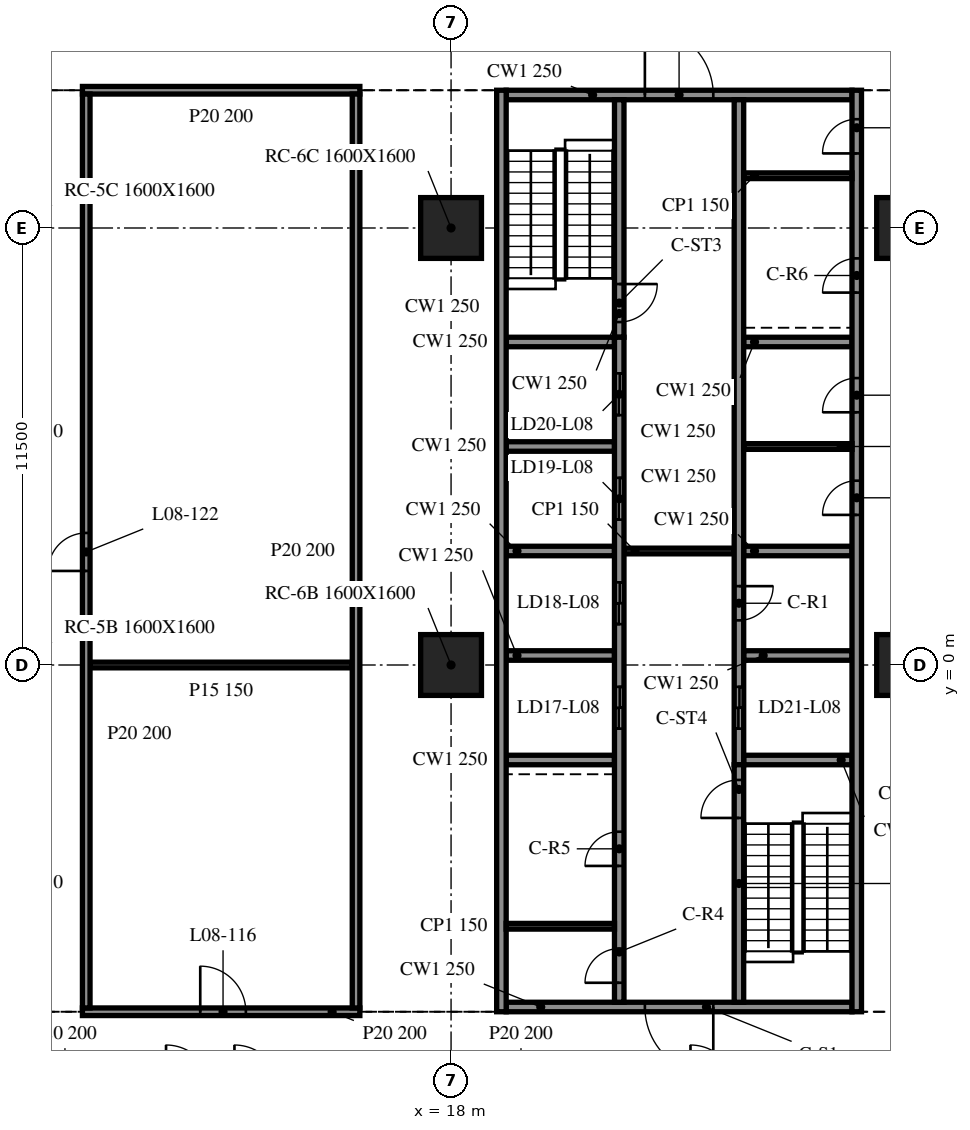
"""IFC4 building model, lengths in metres.
Left out: names, types, materials, properties, quantities, classifications, styles, units other than length and angle.
Written with IfcOpenShell. Run it as: python <this file> out.ifc"""

import sys

from ifc_helpers import new_model, si_unit, direction, frame, frame_2d, origin, origin_2d, place, context, subcontext, project, spatial, rectangle, extrude, element, fill, save


model = new_model("IFC4")
c1 = context("Model", 3, precision=1e-05, world=origin(), true_north=direction((0.0, 1.0)))
c2 = subcontext(c1, "Body", "Model", "MODEL_VIEW")
j1 = project(units=[si_unit("LENGTHUNIT", "METRE"), si_unit("PLANEANGLEUNIT", "RADIAN")], contexts=[c1])
p1 = place(None, origin())
s1 = spatial("IfcSite", under=j1, at=p1, CompositionType="ELEMENT")
p2 = place(p1, origin())
s2 = spatial("IfcBuilding", under=s1, at=p2, CompositionType="ELEMENT")
p3 = place(p2, frame((0.0, 0.0, 37.3)))
s3 = spatial("IfcBuildingStorey", under=s2, at=p3, CompositionType="ELEMENT", Elevation=37.3)
for number, where, z_axis, x_axis in (
    (1, (18.0, 0.0, -0.34), (0.0, 0.0, 1.0), (1.0, 0.0, 0.0)),
    (2, (18.0, 11.5, -0.34), (0.0, 0.0, 1.0), (1.0, 0.0, 0.0)),
    (3, (30.0, 0.0, -0.34), (0.0, 0.0, 1.0), (1.0, 0.0, 0.0)),
    (4, (30.0, 11.5, -0.34), (0.0, 0.0, 1.0), (1.0, 0.0, 0.0)),
):
    element("IfcColumn", number, at=place(p3, frame(where, z_axis=z_axis, x_axis=x_axis)), inside=s3, PredefinedType="COLUMN", context=c2, shape_type="SweptSolid", body=[
        extrude(rectangle(XDim=1.6, YDim=1.6, at=origin_2d()), origin(), (0.0, 0.0, 1.0), 4.09),
    ])
p4 = place(p3, frame((19.325, 15.125, 0.0), z_axis=(0.0, 0.0, 1.0), x_axis=(0.0, -1.0, 0.0)))
e5 = element("IfcWall", 5, at=p4, inside=s3, PredefinedType="SOLIDWALL", context=c2, shape_type="SweptSolid", body=[
    extrude(rectangle(XDim=24.25, YDim=0.25, at=frame_2d((12.125, 0.0))), origin(), (0.0, 0.0, 1.0), 3.75),
])
p5 = place(p3, frame((28.675, -9.125, 0.0), z_axis=(0.0, 0.0, 1.0), x_axis=(0.0, 1.0, 0.0)))
e6 = element("IfcWall", 6, at=p5, inside=s3, PredefinedType="SOLIDWALL", context=c2, shape_type="SweptSolid", body=[
    extrude(rectangle(XDim=24.25, YDim=0.25, at=frame_2d((12.125, 0.0))), origin(), (0.0, 0.0, 1.0), 3.75),
])
p6 = place(p5, frame((13.075, 0.0, 0.0)))
e7 = element("IfcOpeningElement", 7, at=p6, cuts=e6, PredefinedType="OPENING", context=c2, shape_type="SweptSolid", body=[
    extrude(rectangle(XDim=0.9, YDim=2.1, at=frame_2d((0.45, 1.05))), frame((0.0, 0.135, 0.0), z_axis=(0.0, -1.0, 0.0), x_axis=(1.0, 0.0, 0.0)), (0.0, 0.0, 1.0), 0.27),
])
p7 = place(p5, frame((15.775, 0.0, 0.0)))
e8 = element("IfcOpeningElement", 8, at=p7, cuts=e6, PredefinedType="OPENING", context=c2, shape_type="SweptSolid", body=[
    extrude(rectangle(XDim=0.9, YDim=2.1, at=frame_2d((0.45, 1.05))), frame((0.0, 0.135, 0.0), z_axis=(0.0, -1.0, 0.0), x_axis=(1.0, 0.0, 0.0)), (0.0, 0.0, 1.0), 0.27),
])
p8 = place(p5, frame((18.925, 0.0, 0.0)))
e9 = element("IfcOpeningElement", 9, at=p8, cuts=e6, PredefinedType="OPENING", context=c2, shape_type="SweptSolid", body=[
    extrude(rectangle(XDim=0.9, YDim=2.1, at=frame_2d((0.45, 1.05))), frame((0.0, 0.135, 0.0), z_axis=(0.0, -1.0, 0.0), x_axis=(1.0, 0.0, 0.0)), (0.0, 0.0, 1.0), 0.27),
])
p9 = place(p5, frame((22.587, 0.0, 0.0)))
e10 = element("IfcOpeningElement", 10, at=p9, cuts=e6, PredefinedType="OPENING", context=c2, shape_type="SweptSolid", body=[
    extrude(rectangle(XDim=0.9, YDim=2.1, at=frame_2d((0.45, 1.05))), frame((0.0, 0.135, 0.0), z_axis=(0.0, -1.0, 0.0), x_axis=(1.0, 0.0, 0.0)), (0.0, 0.0, 1.0), 0.27),
])
p10 = place(p3, frame((28.55, -9.0, 0.0), z_axis=(0.0, 0.0, 1.0), x_axis=(-1.0, 0.0, 0.0)))
e11 = element("IfcWall", 11, at=p10, inside=s3, PredefinedType="SOLIDWALL", context=c2, shape_type="SweptSolid", body=[
    extrude(rectangle(XDim=9.1, YDim=0.25, at=frame_2d((4.55, 0.0))), origin(), (0.0, 0.0, 1.0), 3.75),
])
p11 = place(p10, frame((3.65, 0.0, 0.0)))
e12 = element("IfcOpeningElement", 12, at=p11, cuts=e11, PredefinedType="OPENING", context=c2, shape_type="SweptSolid", body=[
    extrude(rectangle(XDim=1.8, YDim=2.1, at=frame_2d((0.9, 1.05))), frame((0.0, 0.135, 0.0), z_axis=(0.0, -1.0, 0.0), x_axis=(1.0, 0.0, 0.0)), (0.0, 0.0, 1.0), 0.27),
])
p12 = place(p3, frame((19.45, 15.0, 0.0), z_axis=(0.0, 0.0, 1.0), x_axis=(1.0, 0.0, 0.0)))
e13 = element("IfcWall", 13, at=p12, inside=s3, PredefinedType="SOLIDWALL", context=c2, shape_type="SweptSolid", body=[
    extrude(rectangle(XDim=9.1, YDim=0.25, at=frame_2d((4.55, 0.0))), origin(), (0.0, 0.0, 1.0), 3.75),
])
p13 = place(p12, frame((3.65, 0.0, 0.0)))
e14 = element("IfcOpeningElement", 14, at=p13, cuts=e13, PredefinedType="OPENING", context=c2, shape_type="SweptSolid", body=[
    extrude(rectangle(XDim=1.8, YDim=2.1, at=frame_2d((0.9, 1.05))), frame((0.0, 0.135, 0.0), z_axis=(0.0, -1.0, 0.0), x_axis=(1.0, 0.0, 0.0)), (0.0, 0.0, 1.0), 0.27),
])
p14 = place(p3, frame((22.425, -8.875, 0.0), z_axis=(0.0, 0.0, 1.0), x_axis=(0.0, 1.0, 0.0)))
e15 = element("IfcWall", 15, at=p14, inside=s3, PredefinedType="SOLIDWALL", context=c2, shape_type="SweptSolid", body=[
    extrude(rectangle(XDim=17.5, YDim=0.25, at=frame_2d((8.75, 0.0))), origin(), (0.0, 0.0, 1.0), 3.75),
])
p15 = place(p14, frame((7.2, 0.0, 0.0)))
e16 = element("IfcOpeningElement", 16, at=p15, cuts=e15, PredefinedType="OPENING", context=c2, shape_type="SweptSolid", body=[
    extrude(rectangle(XDim=1.1, YDim=2.1, at=frame_2d((0.55, 1.05))), frame((0.0, 0.135, 0.0), z_axis=(0.0, -1.0, 0.0), x_axis=(1.0, 0.0, 0.0)), (0.0, 0.0, 1.0), 0.27),
])
p16 = place(p14, frame((9.95, 0.0, 0.0)))
e17 = element("IfcOpeningElement", 17, at=p16, cuts=e15, PredefinedType="OPENING", context=c2, shape_type="SweptSolid", body=[
    extrude(rectangle(XDim=1.1, YDim=2.1, at=frame_2d((0.55, 1.05))), frame((0.0, 0.135, 0.0), z_axis=(0.0, -1.0, 0.0), x_axis=(1.0, 0.0, 0.0)), (0.0, 0.0, 1.0), 0.27),
])
p17 = place(p14, frame((12.7, 0.0, 0.0)))
e18 = element("IfcOpeningElement", 18, at=p17, cuts=e15, PredefinedType="OPENING", context=c2, shape_type="SweptSolid", body=[
    extrude(rectangle(XDim=1.1, YDim=2.1, at=frame_2d((0.55, 1.05))), frame((0.0, 0.135, 0.0), z_axis=(0.0, -1.0, 0.0), x_axis=(1.0, 0.0, 0.0)), (0.0, 0.0, 1.0), 0.27),
])
p18 = place(p14, frame((15.45, 0.0, 0.0)))
e19 = element("IfcOpeningElement", 19, at=p18, cuts=e15, PredefinedType="OPENING", context=c2, shape_type="SweptSolid", body=[
    extrude(rectangle(XDim=1.1, YDim=2.1, at=frame_2d((0.55, 1.05))), frame((0.0, 0.135, 0.0), z_axis=(0.0, -1.0, 0.0), x_axis=(1.0, 0.0, 0.0)), (0.0, 0.0, 1.0), 0.27),
])
p19 = place(p14, frame((0.512, 0.0, 0.0)))
e20 = element("IfcOpeningElement", 20, at=p19, cuts=e15, PredefinedType="OPENING", context=c2, shape_type="SweptSolid", body=[
    extrude(rectangle(XDim=0.9, YDim=2.1, at=frame_2d((0.45, 1.05))), frame((0.0, 0.135, 0.0), z_axis=(0.0, -1.0, 0.0), x_axis=(1.0, 0.0, 0.0)), (0.0, 0.0, 1.0), 0.27),
])
p20 = place(p14, frame((3.587, 0.0, 0.0)))
e21 = element("IfcOpeningElement", 21, at=p20, cuts=e15, PredefinedType="OPENING", context=c2, shape_type="SweptSolid", body=[
    extrude(rectangle(XDim=0.9, YDim=2.1, at=frame_2d((0.45, 1.05))), frame((0.0, 0.135, 0.0), z_axis=(0.0, -1.0, 0.0), x_axis=(1.0, 0.0, 0.0)), (0.0, 0.0, 1.0), 0.27),
])
p21 = place(p3, frame((22.425, 14.875, 0.0), z_axis=(0.0, 0.0, 1.0), x_axis=(0.0, -1.0, 0.0)))
e22 = element("IfcWall", 22, at=p21, inside=s3, PredefinedType="SOLIDWALL", context=c2, shape_type="SweptSolid", body=[
    extrude(rectangle(XDim=6.25, YDim=0.25, at=frame_2d((3.125, 0.0))), origin(), (0.0, 0.0, 1.0), 3.75),
])
p22 = place(p21, frame((4.85, 0.0, 0.0)))
e23 = element("IfcOpeningElement", 23, at=p22, cuts=e22, PredefinedType="OPENING", context=c2, shape_type="SweptSolid", body=[
    extrude(rectangle(XDim=1.0, YDim=2.1, at=frame_2d((0.5, 1.05))), frame((0.0, 0.135, 0.0), z_axis=(0.0, -1.0, 0.0), x_axis=(1.0, 0.0, 0.0)), (0.0, 0.0, 1.0), 0.27),
])
p23 = place(p3, frame((25.575, -8.875, 0.0), z_axis=(0.0, 0.0, 1.0), x_axis=(0.0, 1.0, 0.0)))
e24 = element("IfcWall", 24, at=p23, inside=s3, PredefinedType="SOLIDWALL", context=c2, shape_type="SweptSolid", body=[
    extrude(rectangle(XDim=6.25, YDim=0.25, at=frame_2d((3.125, 0.0))), origin(), (0.0, 0.0, 1.0), 3.75),
])
p24 = place(p23, frame((4.85, 0.0, 0.0)))
e25 = element("IfcOpeningElement", 25, at=p24, cuts=e24, PredefinedType="OPENING", context=c2, shape_type="SweptSolid", body=[
    extrude(rectangle(XDim=1.0, YDim=2.1, at=frame_2d((0.5, 1.05))), frame((0.0, 0.135, 0.0), z_axis=(0.0, -1.0, 0.0), x_axis=(1.0, 0.0, 0.0)), (0.0, 0.0, 1.0), 0.27),
])
p25 = place(p3, frame((25.575, 14.875, 0.0), z_axis=(0.0, 0.0, 1.0), x_axis=(0.0, -1.0, 0.0)))
e26 = element("IfcWall", 26, at=p25, inside=s3, PredefinedType="SOLIDWALL", context=c2, shape_type="SweptSolid", body=[
    extrude(rectangle(XDim=17.5, YDim=0.25, at=frame_2d((8.75, 0.0))), origin(), (0.0, 0.0, 1.0), 3.75),
])
p26 = place(p25, frame((15.45, 0.0, 0.0)))
e27 = element("IfcOpeningElement", 27, at=p26, cuts=e26, PredefinedType="OPENING", context=c2, shape_type="SweptSolid", body=[
    extrude(rectangle(XDim=1.1, YDim=2.1, at=frame_2d((0.55, 1.05))), frame((0.0, 0.135, 0.0), z_axis=(0.0, -1.0, 0.0), x_axis=(1.0, 0.0, 0.0)), (0.0, 0.0, 1.0), 0.27),
])
p27 = place(p25, frame((12.8, 0.0, 0.0)))
e28 = element("IfcOpeningElement", 28, at=p27, cuts=e26, PredefinedType="OPENING", context=c2, shape_type="SweptSolid", body=[
    extrude(rectangle(XDim=0.9, YDim=2.1, at=frame_2d((0.45, 1.05))), frame((0.0, 0.135, 0.0), z_axis=(0.0, -1.0, 0.0), x_axis=(1.0, 0.0, 0.0)), (0.0, 0.0, 1.0), 0.27),
])
for number, where, z_axis, x_axis in (
    (29, (19.45, -2.5, 0.0), (0.0, 0.0, 1.0), (1.0, 0.0, 0.0)),
    (30, (19.45, 0.25, 0.0), (0.0, 0.0, 1.0), (1.0, 0.0, 0.0)),
    (31, (19.45, 3.0, 0.0), (0.0, 0.0, 1.0), (1.0, 0.0, 0.0)),
    (32, (19.45, 5.75, 0.0), (0.0, 0.0, 1.0), (1.0, 0.0, 0.0)),
    (33, (19.45, 8.5, 0.0), (0.0, 0.0, 1.0), (1.0, 0.0, 0.0)),
    (34, (25.7, -2.5, 0.0), (0.0, 0.0, 1.0), (1.0, 0.0, 0.0)),
    (35, (25.7, 0.25, 0.0), (0.0, 0.0, 1.0), (1.0, 0.0, 0.0)),
    (36, (25.7, 3.0, 0.0), (0.0, 0.0, 1.0), (1.0, 0.0, 0.0)),
    (37, (25.7, 8.5, 0.0), (0.0, 0.0, 1.0), (1.0, 0.0, 0.0)),
):
    element("IfcWall", number, at=place(p3, frame(where, z_axis=z_axis, x_axis=x_axis)), inside=s3, PredefinedType="SOLIDWALL", context=c2, shape_type="SweptSolid", body=[
        extrude(rectangle(XDim=2.85, YDim=0.25, at=frame_2d((1.425, 0.0))), origin(), (0.0, 0.0, 1.0), 3.75),
    ])
p28 = place(p3, frame((22.55, 3.0, 0.0), z_axis=(0.0, 0.0, 1.0), x_axis=(1.0, 0.0, 0.0)))
e38 = element("IfcWall", 38, at=p28, inside=s3, PredefinedType="PARTITIONING", context=c2, shape_type="SweptSolid", body=[
    extrude(rectangle(XDim=2.9, YDim=0.15, at=frame_2d((1.45, 0.0))), origin(), (0.0, 0.0, 1.0), 3.75),
])
for number, where, z_axis, x_axis in (
    (39, (25.7, 5.75, 0.0), (0.0, 0.0, 1.0), (1.0, 0.0, 0.0)),
    (40, (19.45, -6.875, 0.0), (0.0, 0.0, 1.0), (1.0, 0.0, 0.0)),
    (41, (25.7, 12.875, 0.0), (0.0, 0.0, 1.0), (1.0, 0.0, 0.0)),
):
    element("IfcWall", number, at=place(p3, frame(where, z_axis=z_axis, x_axis=x_axis)), inside=s3, PredefinedType="PARTITIONING", context=c2, shape_type="SweptSolid", body=[
        extrude(rectangle(XDim=2.85, YDim=0.15, at=frame_2d((1.425, 0.0))), origin(), (0.0, 0.0, 1.0), 3.75),
    ])
p29 = place(p3, frame((8.3, -9.125, 0.0), z_axis=(0.0, 0.0, 1.0), x_axis=(1.0, 0.0, 0.0)))
e42 = element("IfcWall", 42, at=p29, inside=s3, PredefinedType="PARTITIONING", context=c2, shape_type="SweptSolid", body=[
    extrude(rectangle(XDim=7.3, YDim=0.2, at=frame_2d((3.65, 0.0))), origin(), (0.0, 0.0, 1.0), 3.75),
])
p30 = place(p29, frame((3.1, 0.0, 0.0)))
e43 = element("IfcOpeningElement", 43, at=p30, cuts=e42, PredefinedType="OPENING", context=c2, shape_type="SweptSolid", body=[
    extrude(rectangle(XDim=1.2, YDim=2.1, at=frame_2d((0.6, 1.05))), frame((0.0, 0.11, 0.0), z_axis=(0.0, -1.0, 0.0), x_axis=(1.0, 0.0, 0.0)), (0.0, 0.0, 1.0), 0.22),
])
p31 = place(p3, frame((8.5, 0.0, 0.0), z_axis=(0.0, 0.0, 1.0), x_axis=(1.0, 0.0, 0.0)))
e44 = element("IfcWall", 44, at=p31, inside=s3, PredefinedType="PARTITIONING", context=c2, shape_type="SweptSolid", body=[
    extrude(rectangle(XDim=6.9, YDim=0.15, at=frame_2d((3.45, 0.0))), origin(), (0.0, 0.0, 1.0), 3.75),
])
p32 = place(p3, frame((8.3, 15.125, 0.0), z_axis=(0.0, 0.0, 1.0), x_axis=(1.0, 0.0, 0.0)))
e45 = element("IfcWall", 45, at=p32, inside=s3, PredefinedType="PARTITIONING", context=c2, shape_type="SweptSolid", body=[
    extrude(rectangle(XDim=7.3, YDim=0.2, at=frame_2d((3.65, 0.0))), origin(), (0.0, 0.0, 1.0), 3.75),
])
p33 = place(p3, frame((8.4, -9.025, 0.0), z_axis=(0.0, 0.0, 1.0), x_axis=(0.0, 1.0, 0.0)))
e46 = element("IfcWall", 46, at=p33, inside=s3, PredefinedType="PARTITIONING", context=c2, shape_type="SweptSolid", body=[
    extrude(rectangle(XDim=24.05, YDim=0.2, at=frame_2d((12.025, 0.0))), origin(), (0.0, 0.0, 1.0), 3.75),
])
p34 = place(p33, frame((11.5, 0.0, 0.0)))
e47 = element("IfcOpeningElement", 47, at=p34, cuts=e46, PredefinedType="OPENING", context=c2, shape_type="SweptSolid", body=[
    extrude(rectangle(XDim=1.0, YDim=2.1, at=frame_2d((0.5, 1.05))), frame((0.0, 0.11, 0.0), z_axis=(0.0, -1.0, 0.0), x_axis=(1.0, 0.0, 0.0)), (0.0, 0.0, 1.0), 0.22),
])
p35 = place(p3, frame((15.5, -9.025, 0.0), z_axis=(0.0, 0.0, 1.0), x_axis=(0.0, 1.0, 0.0)))
e48 = element("IfcWall", 48, at=p35, inside=s3, PredefinedType="PARTITIONING", context=c2, shape_type="SweptSolid", body=[
    extrude(rectangle(XDim=24.05, YDim=0.2, at=frame_2d((12.025, 0.0))), origin(), (0.0, 0.0, 1.0), 3.75),
])
p36 = place(p11, origin())
e49 = element("IfcDoor", 49, at=p36, inside=s3, OperationType="DOUBLE_DOOR_SINGLE_SWING", PredefinedType="DOOR", context=c2, shape_type="SweptSolid", body=[
    extrude(rectangle(XDim=1.8, YDim=2.1, at=frame_2d((0.9, 1.05))), frame((0.0, 0.025, 0.0), z_axis=(0.0, -1.0, 0.0), x_axis=(1.0, 0.0, 0.0)), (0.0, 0.0, 1.0), 0.05),
])
fill(e12, e49)
p37 = place(p13, origin())
e50 = element("IfcDoor", 50, at=p37, inside=s3, OperationType="DOUBLE_DOOR_SINGLE_SWING", PredefinedType="DOOR", context=c2, shape_type="SweptSolid", body=[
    extrude(rectangle(XDim=1.8, YDim=2.1, at=frame_2d((0.9, 1.05))), frame((0.0, 0.025, 0.0), z_axis=(0.0, -1.0, 0.0), x_axis=(1.0, 0.0, 0.0)), (0.0, 0.0, 1.0), 0.05),
])
fill(e14, e50)
p38 = place(p26, origin())
e51 = element("IfcDoor", 51, at=p38, inside=s3, OperationType="DOUBLE_DOOR_SLIDING", PredefinedType="DOOR", context=c2, shape_type="SweptSolid", body=[
    extrude(rectangle(XDim=1.1, YDim=2.1, at=frame_2d((0.55, 1.05))), frame((0.0, 0.025, 0.0), z_axis=(0.0, -1.0, 0.0), x_axis=(1.0, 0.0, 0.0)), (0.0, 0.0, 1.0), 0.05),
])
fill(e27, e51)
p39 = place(p15, origin())
e52 = element("IfcDoor", 52, at=p39, inside=s3, OperationType="DOUBLE_DOOR_SLIDING", PredefinedType="DOOR", context=c2, shape_type="SweptSolid", body=[
    extrude(rectangle(XDim=1.1, YDim=2.1, at=frame_2d((0.55, 1.05))), frame((0.0, 0.025, 0.0), z_axis=(0.0, -1.0, 0.0), x_axis=(1.0, 0.0, 0.0)), (0.0, 0.0, 1.0), 0.05),
])
fill(e16, e52)
p40 = place(p16, origin())
e53 = element("IfcDoor", 53, at=p40, inside=s3, OperationType="DOUBLE_DOOR_SLIDING", PredefinedType="DOOR", context=c2, shape_type="SweptSolid", body=[
    extrude(rectangle(XDim=1.1, YDim=2.1, at=frame_2d((0.55, 1.05))), frame((0.0, 0.025, 0.0), z_axis=(0.0, -1.0, 0.0), x_axis=(1.0, 0.0, 0.0)), (0.0, 0.0, 1.0), 0.05),
])
fill(e17, e53)
p41 = place(p17, origin())
e54 = element("IfcDoor", 54, at=p41, inside=s3, OperationType="DOUBLE_DOOR_SLIDING", PredefinedType="DOOR", context=c2, shape_type="SweptSolid", body=[
    extrude(rectangle(XDim=1.1, YDim=2.1, at=frame_2d((0.55, 1.05))), frame((0.0, 0.025, 0.0), z_axis=(0.0, -1.0, 0.0), x_axis=(1.0, 0.0, 0.0)), (0.0, 0.0, 1.0), 0.05),
])
fill(e18, e54)
p42 = place(p18, origin())
e55 = element("IfcDoor", 55, at=p42, inside=s3, OperationType="DOUBLE_DOOR_SLIDING", PredefinedType="DOOR", context=c2, shape_type="SweptSolid", body=[
    extrude(rectangle(XDim=1.1, YDim=2.1, at=frame_2d((0.55, 1.05))), frame((0.0, 0.025, 0.0), z_axis=(0.0, -1.0, 0.0), x_axis=(1.0, 0.0, 0.0)), (0.0, 0.0, 1.0), 0.05),
])
fill(e19, e55)
p43 = place(p27, origin())
e56 = element("IfcDoor", 56, at=p43, inside=s3, OperationType="SINGLE_SWING_LEFT", PredefinedType="DOOR", context=c2, shape_type="SweptSolid", body=[
    extrude(rectangle(XDim=0.9, YDim=2.1, at=frame_2d((0.45, 1.05))), frame((0.0, 0.025, 0.0), z_axis=(0.0, -1.0, 0.0), x_axis=(1.0, 0.0, 0.0)), (0.0, 0.0, 1.0), 0.05),
])
fill(e28, e56)
p44 = place(p6, origin())
e57 = element("IfcDoor", 57, at=p44, inside=s3, OperationType="SINGLE_SWING_RIGHT", PredefinedType="DOOR", context=c2, shape_type="SweptSolid", body=[
    extrude(rectangle(XDim=0.9, YDim=2.1, at=frame_2d((0.45, 1.05))), frame((0.0, 0.025, 0.0), z_axis=(0.0, -1.0, 0.0), x_axis=(1.0, 0.0, 0.0)), (0.0, 0.0, 1.0), 0.05),
])
fill(e7, e57)
p45 = place(p7, origin())
e58 = element("IfcDoor", 58, at=p45, inside=s3, OperationType="SINGLE_SWING_LEFT", PredefinedType="DOOR", context=c2, shape_type="SweptSolid", body=[
    extrude(rectangle(XDim=0.9, YDim=2.1, at=frame_2d((0.45, 1.05))), frame((0.0, 0.025, 0.0), z_axis=(0.0, -1.0, 0.0), x_axis=(1.0, 0.0, 0.0)), (0.0, 0.0, 1.0), 0.05),
])
fill(e8, e58)
p46 = place(p19, origin())
e59 = element("IfcDoor", 59, at=p46, inside=s3, OperationType="SINGLE_SWING_RIGHT", PredefinedType="DOOR", context=c2, shape_type="SweptSolid", body=[
    extrude(rectangle(XDim=0.9, YDim=2.1, at=frame_2d((0.45, 1.05))), frame((0.0, 0.025, 0.0), z_axis=(0.0, -1.0, 0.0), x_axis=(1.0, 0.0, 0.0)), (0.0, 0.0, 1.0), 0.05),
])
fill(e20, e59)
p47 = place(p20, origin())
e60 = element("IfcDoor", 60, at=p47, inside=s3, OperationType="SINGLE_SWING_LEFT", PredefinedType="DOOR", context=c2, shape_type="SweptSolid", body=[
    extrude(rectangle(XDim=0.9, YDim=2.1, at=frame_2d((0.45, 1.05))), frame((0.0, 0.025, 0.0), z_axis=(0.0, -1.0, 0.0), x_axis=(1.0, 0.0, 0.0)), (0.0, 0.0, 1.0), 0.05),
])
fill(e21, e60)
p48 = place(p8, origin())
e61 = element("IfcDoor", 61, at=p48, inside=s3, OperationType="SINGLE_SWING_RIGHT", PredefinedType="DOOR", context=c2, shape_type="SweptSolid", body=[
    extrude(rectangle(XDim=0.9, YDim=2.1, at=frame_2d((0.45, 1.05))), frame((0.0, 0.025, 0.0), z_axis=(0.0, -1.0, 0.0), x_axis=(1.0, 0.0, 0.0)), (0.0, 0.0, 1.0), 0.05),
])
fill(e9, e61)
p49 = place(p9, origin())
e62 = element("IfcDoor", 62, at=p49, inside=s3, OperationType="SINGLE_SWING_LEFT", PredefinedType="DOOR", context=c2, shape_type="SweptSolid", body=[
    extrude(rectangle(XDim=0.9, YDim=2.1, at=frame_2d((0.45, 1.05))), frame((0.0, 0.025, 0.0), z_axis=(0.0, -1.0, 0.0), x_axis=(1.0, 0.0, 0.0)), (0.0, 0.0, 1.0), 0.05),
])
fill(e10, e62)
p50 = place(p22, origin())
e63 = element("IfcDoor", 63, at=p50, inside=s3, OperationType="SINGLE_SWING_RIGHT", PredefinedType="DOOR", context=c2, shape_type="SweptSolid", body=[
    extrude(rectangle(XDim=1.0, YDim=2.1, at=frame_2d((0.5, 1.05))), frame((0.0, 0.025, 0.0), z_axis=(0.0, -1.0, 0.0), x_axis=(1.0, 0.0, 0.0)), (0.0, 0.0, 1.0), 0.05),
])
fill(e23, e63)
p51 = place(p24, origin())
e64 = element("IfcDoor", 64, at=p51, inside=s3, OperationType="SINGLE_SWING_LEFT", PredefinedType="DOOR", context=c2, shape_type="SweptSolid", body=[
    extrude(rectangle(XDim=1.0, YDim=2.1, at=frame_2d((0.5, 1.05))), frame((0.0, 0.025, 0.0), z_axis=(0.0, -1.0, 0.0), x_axis=(1.0, 0.0, 0.0)), (0.0, 0.0, 1.0), 0.05),
])
fill(e25, e64)
p52 = place(p30, origin())
e65 = element("IfcDoor", 65, at=p52, inside=s3, OperationType="SINGLE_SWING_RIGHT", PredefinedType="DOOR", context=c2, shape_type="SweptSolid", body=[
    extrude(rectangle(XDim=1.2, YDim=2.1, at=frame_2d((0.6, 1.05))), frame((0.0, 0.025, 0.0), z_axis=(0.0, -1.0, 0.0), x_axis=(1.0, 0.0, 0.0)), (0.0, 0.0, 1.0), 0.05),
])
fill(e43, e65)
p53 = place(p34, origin())
e66 = element("IfcDoor", 66, at=p53, inside=s3, OperationType="SINGLE_SWING_RIGHT", PredefinedType="DOOR", context=c2, shape_type="SweptSolid", body=[
    extrude(rectangle(XDim=1.0, YDim=2.1, at=frame_2d((0.5, 1.05))), frame((0.0, 0.025, 0.0), z_axis=(0.0, -1.0, 0.0), x_axis=(1.0, 0.0, 0.0)), (0.0, 0.0, 1.0), 0.05),
])
fill(e47, e66)
save(model, sys.argv[1])
